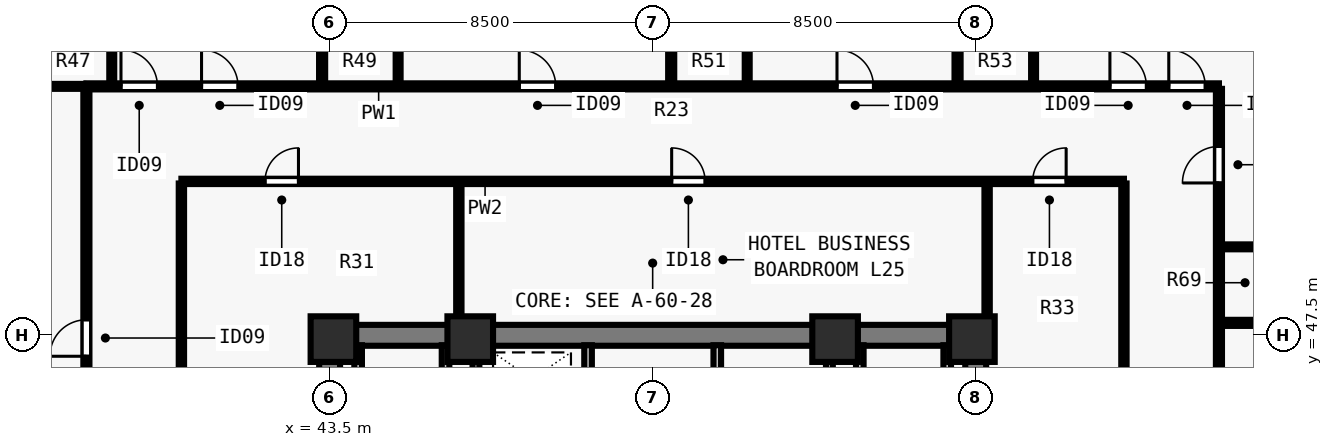
"""IFC4 building model, lengths in metres.
Left out: names, types, materials, properties, quantities, classifications, styles, units other than length and angle.
Written with IfcOpenShell. Run it as: python <this file> out.ifc"""

import sys

from ifc_helpers import new_model, si_unit, direction, frame, frame_2d, origin, origin_2d, place, context, subcontext, project, spatial, rectangle, extrude, element, fill, save


model = new_model("IFC4")
c1 = context("Model", 3, precision=1e-05, world=origin(), true_north=direction((0.0, 1.0)))
c2 = subcontext(c1, "Body", "Model", "MODEL_VIEW")
j1 = project(units=[si_unit("LENGTHUNIT", "METRE"), si_unit("PLANEANGLEUNIT", "RADIAN")], contexts=[c1])
p1 = place(None, origin())
s1 = spatial("IfcSite", under=j1, at=p1, CompositionType="ELEMENT")
p2 = place(p1, origin())
s2 = spatial("IfcBuilding", under=s1, at=p2, CompositionType="ELEMENT")
p3 = place(p2, frame((0.0, 0.0, 93.5)))
s3 = spatial("IfcBuildingStorey", under=s2, at=p3, CompositionType="ELEMENT", Elevation=93.5)
for number, where, z_axis, x_axis in (
    (1, (43.6, 47.4, 0.0), (0.0, 0.0, 1.0), (1.0, 0.0, 0.0)),
    (2, (47.2, 47.4, 0.0), (0.0, 0.0, 1.0), (1.0, 0.0, 0.0)),
    (3, (56.8, 47.4, 0.0), (0.0, 0.0, 1.0), (1.0, 0.0, 0.0)),
    (4, (60.4, 47.4, 0.0), (0.0, 0.0, 1.0), (1.0, 0.0, 0.0)),
):
    element("IfcColumn", number, at=place(p3, frame(where, z_axis=z_axis, x_axis=x_axis)), inside=s3, PredefinedType="COLUMN", context=c2, shape_type="SweptSolid", body=[
        extrude(rectangle(XDim=1.2, YDim=1.2, at=origin_2d()), origin(), (0.0, 0.0, 1.0), 3.5),
    ])
p4 = place(p3, frame((43.225, 47.5, 0.0), z_axis=(0.0, 0.0, 1.0), x_axis=(1.0, 0.0, 0.0)))
e5 = element("IfcWall", 5, at=p4, inside=s3, PredefinedType="SHEAR", context=c2, shape_type="SweptSolid", body=[
    extrude(rectangle(XDim=17.55, YDim=0.55, at=frame_2d((8.775, 0.0))), origin(), (0.0, 0.0, 1.0), 3.24),
])
for number, where, z_axis, x_axis in (
    (6, (43.5, 40.8, 0.0), (0.0, 0.0, 1.0), (0.0, 1.0, 0.0)),
    (7, (60.5, 40.8, 0.0), (0.0, 0.0, 1.0), (0.0, 1.0, 0.0)),
):
    element("IfcWall", number, at=place(p3, frame(where, z_axis=z_axis, x_axis=x_axis)), inside=s3, PredefinedType="SHEAR", context=c2, shape_type="SweptSolid", body=[
        extrude(rectangle(XDim=6.435, YDim=0.55, at=frame_2d((3.218, 0.0))), origin(), (0.0, 0.0, 1.0), 3.24),
    ])
p5 = place(p3, frame((50.3, 40.585, 0.0), z_axis=(0.0, 0.0, 1.0), x_axis=(0.0, 1.0, 0.0)))
e8 = element("IfcWall", 8, at=p5, inside=s3, PredefinedType="SOLIDWALL", context=c2, shape_type="SweptSolid", body=[
    extrude(rectangle(XDim=6.655, YDim=0.2, at=frame_2d((3.328, 0.0))), origin(), (0.0, 0.0, 1.0), 3.24),
])
p6 = place(p5, frame((5.065, 0.0, 0.0)))
e9 = element("IfcOpeningElement", 9, at=p6, cuts=e8, PredefinedType="OPENING", context=c2, shape_type="SweptSolid", body=[
    extrude(rectangle(XDim=0.8, YDim=2.08, at=frame_2d((0.4, 1.04))), frame((0.0, 0.11, 0.0), z_axis=(0.0, -1.0, 0.0), x_axis=(1.0, 0.0, 0.0)), (0.0, 0.0, 1.0), 0.22),
])
p7 = place(p3, frame((53.7, 40.585, 0.0), z_axis=(0.0, 0.0, 1.0), x_axis=(0.0, 1.0, 0.0)))
e10 = element("IfcWall", 10, at=p7, inside=s3, PredefinedType="SOLIDWALL", context=c2, shape_type="SweptSolid", body=[
    extrude(rectangle(XDim=6.655, YDim=0.2, at=frame_2d((3.328, 0.0))), origin(), (0.0, 0.0, 1.0), 3.24),
])
p8 = place(p7, frame((0.195, 0.0, 0.0)))
e11 = element("IfcOpeningElement", 11, at=p8, cuts=e10, PredefinedType="OPENING", context=c2, shape_type="SweptSolid", body=[
    extrude(rectangle(XDim=0.8, YDim=2.08, at=frame_2d((0.4, 1.04))), frame((0.0, 0.11, 0.0), z_axis=(0.0, -1.0, 0.0), x_axis=(1.0, 0.0, 0.0)), (0.0, 0.0, 1.0), 0.22),
])
p9 = place(p7, frame((4.265, 0.0, 0.0)))
e12 = element("IfcOpeningElement", 12, at=p9, cuts=e10, PredefinedType="OPENING", context=c2, shape_type="SweptSolid", body=[
    extrude(rectangle(XDim=0.95, YDim=2.12, at=frame_2d((0.475, 1.06))), frame((0.0, 0.11, 0.0), z_axis=(0.0, -1.0, 0.0), x_axis=(1.0, 0.0, 0.0)), (0.0, 0.0, 1.0), 0.22),
])
for number, where, z_axis, x_axis in (
    (13, (46.55, 43.735, 0.0), (0.0, 0.0, 1.0), (0.0, 1.0, 0.0)),
    (14, (44.25, 43.735, 0.0), (0.0, 0.0, 1.0), (0.0, 1.0, 0.0)),
    (15, (57.45, 43.735, 0.0), (0.0, 0.0, 1.0), (0.0, 1.0, 0.0)),
    (16, (59.75, 43.735, 0.0), (0.0, 0.0, 1.0), (0.0, 1.0, 0.0)),
):
    element("IfcWall", number, at=place(p3, frame(where, z_axis=z_axis, x_axis=x_axis)), inside=s3, PredefinedType="SOLIDWALL", context=c2, shape_type="SweptSolid", body=[
        extrude(rectangle(XDim=3.505, YDim=0.2, at=frame_2d((1.752, 0.0))), origin(), (0.0, 0.0, 1.0), 3.24),
    ])
for number, where, z_axis, x_axis in (
    (17, (47.35, 43.735, 0.0), (0.0, 0.0, 1.0), (0.0, 1.0, 0.0)),
    (18, (56.65, 43.735, 0.0), (0.0, 0.0, 1.0), (0.0, 1.0, 0.0)),
):
    element("IfcWall", number, at=place(p3, frame(where, z_axis=z_axis, x_axis=x_axis)), inside=s3, PredefinedType="SOLIDWALL", context=c2, shape_type="SweptSolid", body=[
        extrude(rectangle(XDim=3.505, YDim=0.18, at=frame_2d((1.752, 0.0))), origin(), (0.0, 0.0, 1.0), 3.24),
    ])
p10 = place(p3, frame((37.1, 54.05, 0.0), z_axis=(0.0, 0.0, 1.0), x_axis=(1.0, 0.0, 0.0)))
e19 = element("IfcWall", 19, at=p10, inside=s3, PredefinedType="PARTITIONING", context=c2, shape_type="SweptSolid", body=[
    extrude(rectangle(XDim=29.8, YDim=0.16, at=frame_2d((14.9, 0.0))), origin(), (0.0, 0.0, 1.0), 3.24),
])
p11 = place(p10, frame((0.91, 0.0, 0.0)))
e20 = element("IfcOpeningElement", 20, at=p11, cuts=e19, PredefinedType="OPENING", context=c2, shape_type="SweptSolid", body=[
    extrude(rectangle(XDim=0.96, YDim=2.15, at=frame_2d((0.48, 1.075))), frame((0.0, 0.09, 0.0), z_axis=(0.0, -1.0, 0.0), x_axis=(1.0, 0.0, 0.0)), (0.0, 0.0, 1.0), 0.18),
])
p12 = place(p10, frame((3.03, 0.0, 0.0)))
e21 = element("IfcOpeningElement", 21, at=p12, cuts=e19, PredefinedType="OPENING", context=c2, shape_type="SweptSolid", body=[
    extrude(rectangle(XDim=0.96, YDim=2.15, at=frame_2d((0.48, 1.075))), frame((0.0, 0.09, 0.0), z_axis=(0.0, -1.0, 0.0), x_axis=(1.0, 0.0, 0.0)), (0.0, 0.0, 1.0), 0.18),
])
p13 = place(p10, frame((11.39, 0.0, 0.0)))
e22 = element("IfcOpeningElement", 22, at=p13, cuts=e19, PredefinedType="OPENING", context=c2, shape_type="SweptSolid", body=[
    extrude(rectangle(XDim=0.96, YDim=2.15, at=frame_2d((0.48, 1.075))), frame((0.0, 0.09, 0.0), z_axis=(0.0, -1.0, 0.0), x_axis=(1.0, 0.0, 0.0)), (0.0, 0.0, 1.0), 0.18),
])
p14 = place(p10, frame((19.75, 0.0, 0.0)))
e23 = element("IfcOpeningElement", 23, at=p14, cuts=e19, PredefinedType="OPENING", context=c2, shape_type="SweptSolid", body=[
    extrude(rectangle(XDim=0.96, YDim=2.15, at=frame_2d((0.48, 1.075))), frame((0.0, 0.09, 0.0), z_axis=(0.0, -1.0, 0.0), x_axis=(1.0, 0.0, 0.0)), (0.0, 0.0, 1.0), 0.18),
])
p15 = place(p10, frame((26.931, 0.0, 0.0)))
e24 = element("IfcOpeningElement", 24, at=p15, cuts=e19, PredefinedType="OPENING", context=c2, shape_type="SweptSolid", body=[
    extrude(rectangle(XDim=0.96, YDim=2.15, at=frame_2d((0.48, 1.075))), frame((0.0, 0.09, 0.0), z_axis=(0.0, -1.0, 0.0), x_axis=(1.0, 0.0, 0.0)), (0.0, 0.0, 1.0), 0.18),
])
p16 = place(p10, frame((28.48, 0.0, 0.0)))
e25 = element("IfcOpeningElement", 25, at=p16, cuts=e19, PredefinedType="OPENING", context=c2, shape_type="SweptSolid", body=[
    extrude(rectangle(XDim=0.96, YDim=2.15, at=frame_2d((0.48, 1.075))), frame((0.0, 0.09, 0.0), z_axis=(0.0, -1.0, 0.0), x_axis=(1.0, 0.0, 0.0)), (0.0, 0.0, 1.0), 0.18),
])
p17 = place(p3, frame((37.1, 24.015, 0.0), z_axis=(0.0, 0.0, 1.0), x_axis=(0.0, 1.0, 0.0)))
e26 = element("IfcWall", 26, at=p17, inside=s3, PredefinedType="PARTITIONING", context=c2, shape_type="SweptSolid", body=[
    extrude(rectangle(XDim=29.97, YDim=0.16, at=frame_2d((14.985, 0.0))), origin(), (0.0, 0.0, 1.0), 3.24),
])
p18 = place(p17, frame((8.134, 0.0, 0.0)))
e27 = element("IfcOpeningElement", 27, at=p18, cuts=e26, PredefinedType="OPENING", context=c2, shape_type="SweptSolid", body=[
    extrude(rectangle(XDim=0.96, YDim=2.15, at=frame_2d((0.48, 1.075))), frame((0.0, 0.09, 0.0), z_axis=(0.0, -1.0, 0.0), x_axis=(1.0, 0.0, 0.0)), (0.0, 0.0, 1.0), 0.18),
])
p19 = place(p17, frame((22.934, 0.0, 0.0)))
e28 = element("IfcOpeningElement", 28, at=p19, cuts=e26, PredefinedType="OPENING", context=c2, shape_type="SweptSolid", body=[
    extrude(rectangle(XDim=0.96, YDim=2.15, at=frame_2d((0.48, 1.075))), frame((0.0, 0.09, 0.0), z_axis=(0.0, -1.0, 0.0), x_axis=(1.0, 0.0, 0.0)), (0.0, 0.0, 1.0), 0.18),
])
p20 = place(p3, frame((66.9, 24.015, 0.0), z_axis=(0.0, 0.0, 1.0), x_axis=(0.0, 1.0, 0.0)))
e29 = element("IfcWall", 29, at=p20, inside=s3, PredefinedType="PARTITIONING", context=c2, shape_type="SweptSolid", body=[
    extrude(rectangle(XDim=29.97, YDim=0.16, at=frame_2d((14.985, 0.0))), origin(), (0.0, 0.0, 1.0), 3.24),
])
p21 = place(p20, frame((3.911, 0.0, 0.0)))
e30 = element("IfcOpeningElement", 30, at=p21, cuts=e29, PredefinedType="OPENING", context=c2, shape_type="SweptSolid", body=[
    extrude(rectangle(XDim=0.96, YDim=2.15, at=frame_2d((0.48, 1.075))), frame((0.0, 0.09, 0.0), z_axis=(0.0, -1.0, 0.0), x_axis=(1.0, 0.0, 0.0)), (0.0, 0.0, 1.0), 0.18),
])
p22 = place(p20, frame((9.544, 0.0, 0.0)))
e31 = element("IfcOpeningElement", 31, at=p22, cuts=e29, PredefinedType="OPENING", context=c2, shape_type="SweptSolid", body=[
    extrude(rectangle(XDim=0.96, YDim=2.15, at=frame_2d((0.48, 1.075))), frame((0.0, 0.09, 0.0), z_axis=(0.0, -1.0, 0.0), x_axis=(1.0, 0.0, 0.0)), (0.0, 0.0, 1.0), 0.18),
])
p23 = place(p20, frame((15.625, 0.0, 0.0)))
e32 = element("IfcOpeningElement", 32, at=p23, cuts=e29, PredefinedType="OPENING", context=c2, shape_type="SweptSolid", body=[
    extrude(rectangle(XDim=0.96, YDim=2.15, at=frame_2d((0.48, 1.075))), frame((0.0, 0.09, 0.0), z_axis=(0.0, -1.0, 0.0), x_axis=(1.0, 0.0, 0.0)), (0.0, 0.0, 1.0), 0.18),
])
p24 = place(p20, frame((21.584, 0.0, 0.0)))
e33 = element("IfcOpeningElement", 33, at=p24, cuts=e29, PredefinedType="OPENING", context=c2, shape_type="SweptSolid", body=[
    extrude(rectangle(XDim=0.96, YDim=2.15, at=frame_2d((0.48, 1.075))), frame((0.0, 0.09, 0.0), z_axis=(0.0, -1.0, 0.0), x_axis=(1.0, 0.0, 0.0)), (0.0, 0.0, 1.0), 0.18),
])
p25 = place(p20, frame((27.494, 0.0, 0.0)))
e34 = element("IfcOpeningElement", 34, at=p25, cuts=e29, PredefinedType="OPENING", context=c2, shape_type="SweptSolid", body=[
    extrude(rectangle(XDim=0.96, YDim=2.15, at=frame_2d((0.48, 1.075))), frame((0.0, 0.09, 0.0), z_axis=(0.0, -1.0, 0.0), x_axis=(1.0, 0.0, 0.0)), (0.0, 0.0, 1.0), 0.18),
])
p26 = place(p3, frame((39.6, 51.55, 0.0), z_axis=(0.0, 0.0, 1.0), x_axis=(1.0, 0.0, 0.0)))
e35 = element("IfcWall", 35, at=p26, inside=s3, PredefinedType="PARTITIONING", context=c2, shape_type="SweptSolid", body=[
    extrude(rectangle(XDim=24.8, YDim=0.14, at=frame_2d((12.4, 0.0))), origin(), (0.0, 0.0, 1.0), 3.24),
])
p27 = place(p26, frame((2.2, 0.0, 0.0)))
e36 = element("IfcOpeningElement", 36, at=p27, cuts=e35, PredefinedType="OPENING", context=c2, shape_type="SweptSolid", body=[
    extrude(rectangle(XDim=0.88, YDim=2.1, at=frame_2d((0.44, 1.05))), frame((0.0, 0.08, 0.0), z_axis=(0.0, -1.0, 0.0), x_axis=(1.0, 0.0, 0.0)), (0.0, 0.0, 1.0), 0.16),
])
p28 = place(p26, frame((12.9, 0.0, 0.0)))
e37 = element("IfcOpeningElement", 37, at=p28, cuts=e35, PredefinedType="OPENING", context=c2, shape_type="SweptSolid", body=[
    extrude(rectangle(XDim=0.88, YDim=2.1, at=frame_2d((0.44, 1.05))), frame((0.0, 0.08, 0.0), z_axis=(0.0, -1.0, 0.0), x_axis=(1.0, 0.0, 0.0)), (0.0, 0.0, 1.0), 0.16),
])
p29 = place(p26, frame((22.4, 0.0, 0.0)))
e38 = element("IfcOpeningElement", 38, at=p29, cuts=e35, PredefinedType="OPENING", context=c2, shape_type="SweptSolid", body=[
    extrude(rectangle(XDim=0.88, YDim=2.1, at=frame_2d((0.44, 1.05))), frame((0.0, 0.08, 0.0), z_axis=(0.0, -1.0, 0.0), x_axis=(1.0, 0.0, 0.0)), (0.0, 0.0, 1.0), 0.16),
])
p30 = place(p3, frame((39.6, 40.8, 0.0), z_axis=(0.0, 0.0, 1.0), x_axis=(0.0, 1.0, 0.0)))
e39 = element("IfcWall", 39, at=p30, inside=s3, PredefinedType="PARTITIONING", context=c2, shape_type="SweptSolid", body=[
    extrude(rectangle(XDim=10.695, YDim=0.14, at=frame_2d((5.348, 0.0))), origin(), (0.0, 0.0, 1.0), 3.24),
])
p31 = place(p30, frame((2.5, 0.0, 0.0)))
e40 = element("IfcOpeningElement", 40, at=p31, cuts=e39, PredefinedType="OPENING", context=c2, shape_type="SweptSolid", body=[
    extrude(rectangle(XDim=0.88, YDim=2.1, at=frame_2d((0.44, 1.05))), frame((0.0, 0.08, 0.0), z_axis=(0.0, -1.0, 0.0), x_axis=(1.0, 0.0, 0.0)), (0.0, 0.0, 1.0), 0.16),
])
p32 = place(p3, frame((64.4, 40.8, 0.0), z_axis=(0.0, 0.0, 1.0), x_axis=(0.0, 1.0, 0.0)))
e41 = element("IfcWall", 41, at=p32, inside=s3, PredefinedType="PARTITIONING", context=c2, shape_type="SweptSolid", body=[
    extrude(rectangle(XDim=10.695, YDim=0.14, at=frame_2d((5.348, 0.0))), origin(), (0.0, 0.0, 1.0), 3.24),
])
p33 = place(p32, frame((2.5, 0.0, 0.0)))
e42 = element("IfcOpeningElement", 42, at=p33, cuts=e41, PredefinedType="OPENING", context=c2, shape_type="SweptSolid", body=[
    extrude(rectangle(XDim=0.88, YDim=2.1, at=frame_2d((0.44, 1.05))), frame((0.0, 0.08, 0.0), z_axis=(0.0, -1.0, 0.0), x_axis=(1.0, 0.0, 0.0)), (0.0, 0.0, 1.0), 0.16),
])
p34 = place(p3, frame((46.9, 47.76, 0.0), z_axis=(0.0, 0.0, 1.0), x_axis=(0.0, 1.0, 0.0)))
e43 = element("IfcWall", 43, at=p34, inside=s3, PredefinedType="PARTITIONING", context=c2, shape_type="SweptSolid", body=[
    extrude(rectangle(XDim=3.735, YDim=0.14, at=frame_2d((1.868, 0.0))), origin(), (0.0, 0.0, 1.0), 3.24),
])
p35 = place(p3, frame((60.8, 47.76, 0.0), z_axis=(0.0, 0.0, 1.0), x_axis=(0.0, 1.0, 0.0)))
e44 = element("IfcWall", 44, at=p35, inside=s3, PredefinedType="PARTITIONING", context=c2, shape_type="SweptSolid", body=[
    extrude(rectangle(XDim=3.735, YDim=0.14, at=frame_2d((1.868, 0.0))), origin(), (0.0, 0.0, 1.0), 2.399),
])
p36 = place(p3, frame((37.768, 54.115, 0.0), z_axis=(0.0, 0.0, 1.0), x_axis=(0.0, 1.0, 0.0)))
e45 = element("IfcWall", 45, at=p36, inside=s3, PredefinedType="PLUMBINGWALL", context=c2, shape_type="SweptSolid", body=[
    extrude(rectangle(XDim=2.235, YDim=0.13, at=frame_2d((1.118, 0.0))), origin(), (0.0, 0.0, 1.0), 2.399),
])
p37 = place(p3, frame((35.833, 54.05, 0.0), z_axis=(0.0, 0.0, 1.0), x_axis=(1.0, 0.0, 0.0)))
e46 = element("IfcWall", 46, at=p37, inside=s3, PredefinedType="PLUMBINGWALL", context=c2, shape_type="SweptSolid", body=[
    extrude(rectangle(XDim=1.188, YDim=0.13, at=frame_2d((0.594, 0.0))), origin(), (0.0, 0.0, 1.0), 3.24),
])
p38 = place(p3, frame((43.302, 54.115, 0.0), z_axis=(0.0, 0.0, 1.0), x_axis=(0.0, 1.0, 0.0)))
e47 = element("IfcWall", 47, at=p38, inside=s3, PredefinedType="PARTITIONING", context=c2, shape_type="SweptSolid", body=[
    extrude(rectangle(XDim=10.04, YDim=0.16, at=frame_2d((5.02, 0.0))), origin(), (0.0, 0.0, 1.0), 3.24),
])
p39 = place(p3, frame((45.302, 54.115, 0.0), z_axis=(0.0, 0.0, 1.0), x_axis=(0.0, 1.0, 0.0)))
e48 = element("IfcWall", 48, at=p39, inside=s3, PredefinedType="PLUMBINGWALL", context=c2, shape_type="SweptSolid", body=[
    extrude(rectangle(XDim=2.235, YDim=0.13, at=frame_2d((1.118, 0.0))), origin(), (0.0, 0.0, 1.0), 3.24),
])
p40 = place(p3, frame((52.488, 54.115, 0.0), z_axis=(0.0, 0.0, 1.0), x_axis=(0.0, 1.0, 0.0)))
e49 = element("IfcWall", 49, at=p40, inside=s3, PredefinedType="PARTITIONING", context=c2, shape_type="SweptSolid", body=[
    extrude(rectangle(XDim=10.04, YDim=0.16, at=frame_2d((5.02, 0.0))), origin(), (0.0, 0.0, 1.0), 2.809),
])
p41 = place(p3, frame((54.488, 54.115, 0.0), z_axis=(0.0, 0.0, 1.0), x_axis=(0.0, 1.0, 0.0)))
e50 = element("IfcWall", 50, at=p41, inside=s3, PredefinedType="PLUMBINGWALL", context=c2, shape_type="SweptSolid", body=[
    extrude(rectangle(XDim=2.235, YDim=0.13, at=frame_2d((1.118, 0.0))), origin(), (0.0, 0.0, 1.0), 3.24),
])
p42 = place(p3, frame((60.022, 54.115, 0.0), z_axis=(0.0, 0.0, 1.0), x_axis=(0.0, 1.0, 0.0)))
e51 = element("IfcWall", 51, at=p42, inside=s3, PredefinedType="PARTITIONING", context=c2, shape_type="SweptSolid", body=[
    extrude(rectangle(XDim=9.97, YDim=0.16, at=frame_2d((4.985, 0.0))), origin(), (0.0, 0.0, 1.0), 3.24),
])
p43 = place(p3, frame((62.022, 54.115, 0.0), z_axis=(0.0, 0.0, 1.0), x_axis=(0.0, 1.0, 0.0)))
e52 = element("IfcWall", 52, at=p43, inside=s3, PredefinedType="PLUMBINGWALL", context=c2, shape_type="SweptSolid", body=[
    extrude(rectangle(XDim=2.235, YDim=0.13, at=frame_2d((1.118, 0.0))), origin(), (0.0, 0.0, 1.0), 3.24),
])
p44 = place(p3, frame((66.965, 47.827, 0.0), z_axis=(0.0, 0.0, 1.0), x_axis=(1.0, 0.0, 0.0)))
e53 = element("IfcWall", 53, at=p44, inside=s3, PredefinedType="PARTITIONING", context=c2, shape_type="SweptSolid", body=[
    extrude(rectangle(XDim=10.19, YDim=0.16, at=frame_2d((5.095, 0.0))), origin(), (0.0, 0.0, 1.0), 3.24),
])
p45 = place(p3, frame((66.965, 49.827, 0.0), z_axis=(0.0, 0.0, 1.0), x_axis=(1.0, 0.0, 0.0)))
e54 = element("IfcWall", 54, at=p45, inside=s3, PredefinedType="PLUMBINGWALL", context=c2, shape_type="SweptSolid", body=[
    extrude(rectangle(XDim=2.235, YDim=0.13, at=frame_2d((1.117, 0.0))), origin(), (0.0, 0.0, 1.0), 3.24),
])
p46 = place(p27, origin())
e55 = element("IfcDoor", 55, at=p46, inside=s3, OperationType="SINGLE_SWING_RIGHT", PredefinedType="DOOR", context=c2, shape_type="SweptSolid", body=[
    extrude(rectangle(XDim=0.88, YDim=2.1, at=frame_2d((0.44, 1.05))), frame((0.0, 0.025, 0.0), z_axis=(0.0, -1.0, 0.0), x_axis=(1.0, 0.0, 0.0)), (0.0, 0.0, 1.0), 0.05),
])
fill(e36, e55)
p47 = place(p28, origin())
e56 = element("IfcDoor", 56, at=p47, inside=s3, OperationType="SINGLE_SWING_LEFT", PredefinedType="DOOR", context=c2, shape_type="SweptSolid", body=[
    extrude(rectangle(XDim=0.88, YDim=2.1, at=frame_2d((0.44, 1.05))), frame((0.0, 0.025, 0.0), z_axis=(0.0, -1.0, 0.0), x_axis=(1.0, 0.0, 0.0)), (0.0, 0.0, 1.0), 0.05),
])
fill(e37, e56)
p48 = place(p29, origin())
e57 = element("IfcDoor", 57, at=p48, inside=s3, OperationType="SINGLE_SWING_RIGHT", PredefinedType="DOOR", context=c2, shape_type="SweptSolid", body=[
    extrude(rectangle(XDim=0.88, YDim=2.1, at=frame_2d((0.44, 1.05))), frame((0.0, 0.025, 0.0), z_axis=(0.0, -1.0, 0.0), x_axis=(1.0, 0.0, 0.0)), (0.0, 0.0, 1.0), 0.05),
])
fill(e38, e57)
p49 = place(p11, origin())
e58 = element("IfcDoor", 58, at=p49, inside=s3, OperationType="SINGLE_SWING_LEFT", PredefinedType="DOOR", context=c2, shape_type="SweptSolid", body=[
    extrude(rectangle(XDim=0.96, YDim=2.15, at=frame_2d((0.48, 1.075))), frame((0.0, 0.025, 0.0), z_axis=(0.0, -1.0, 0.0), x_axis=(1.0, 0.0, 0.0)), (0.0, 0.0, 1.0), 0.05),
])
fill(e20, e58)
p50 = place(p12, origin())
e59 = element("IfcDoor", 59, at=p50, inside=s3, OperationType="SINGLE_SWING_LEFT", PredefinedType="DOOR", context=c2, shape_type="SweptSolid", body=[
    extrude(rectangle(XDim=0.96, YDim=2.15, at=frame_2d((0.48, 1.075))), frame((0.0, 0.025, 0.0), z_axis=(0.0, -1.0, 0.0), x_axis=(1.0, 0.0, 0.0)), (0.0, 0.0, 1.0), 0.05),
])
fill(e21, e59)
p51 = place(p13, origin())
e60 = element("IfcDoor", 60, at=p51, inside=s3, OperationType="SINGLE_SWING_LEFT", PredefinedType="DOOR", context=c2, shape_type="SweptSolid", body=[
    extrude(rectangle(XDim=0.96, YDim=2.15, at=frame_2d((0.48, 1.075))), frame((0.0, 0.025, 0.0), z_axis=(0.0, -1.0, 0.0), x_axis=(1.0, 0.0, 0.0)), (0.0, 0.0, 1.0), 0.05),
])
fill(e22, e60)
p52 = place(p14, origin())
e61 = element("IfcDoor", 61, at=p52, inside=s3, OperationType="SINGLE_SWING_LEFT", PredefinedType="DOOR", context=c2, shape_type="SweptSolid", body=[
    extrude(rectangle(XDim=0.96, YDim=2.15, at=frame_2d((0.48, 1.075))), frame((0.0, 0.025, 0.0), z_axis=(0.0, -1.0, 0.0), x_axis=(1.0, 0.0, 0.0)), (0.0, 0.0, 1.0), 0.05),
])
fill(e23, e61)
p53 = place(p15, origin())
e62 = element("IfcDoor", 62, at=p53, inside=s3, OperationType="SINGLE_SWING_LEFT", PredefinedType="DOOR", context=c2, shape_type="SweptSolid", body=[
    extrude(rectangle(XDim=0.96, YDim=2.15, at=frame_2d((0.48, 1.075))), frame((0.0, 0.025, 0.0), z_axis=(0.0, -1.0, 0.0), x_axis=(1.0, 0.0, 0.0)), (0.0, 0.0, 1.0), 0.05),
])
fill(e24, e62)
p54 = place(p16, origin())
e63 = element("IfcDoor", 63, at=p54, inside=s3, OperationType="SINGLE_SWING_LEFT", PredefinedType="DOOR", context=c2, shape_type="SweptSolid", body=[
    extrude(rectangle(XDim=0.96, YDim=2.15, at=frame_2d((0.48, 1.075))), frame((0.0, 0.025, 0.0), z_axis=(0.0, -1.0, 0.0), x_axis=(1.0, 0.0, 0.0)), (0.0, 0.0, 1.0), 0.05),
])
fill(e25, e63)
p55 = place(p19, origin())
e64 = element("IfcDoor", 64, at=p55, inside=s3, OperationType="SINGLE_SWING_LEFT", PredefinedType="DOOR", context=c2, shape_type="SweptSolid", body=[
    extrude(rectangle(XDim=0.96, YDim=2.15, at=frame_2d((0.48, 1.075))), frame((0.0, 0.025, 0.0), z_axis=(0.0, -1.0, 0.0), x_axis=(1.0, 0.0, 0.0)), (0.0, 0.0, 1.0), 0.05),
])
fill(e28, e64)
p56 = place(p25, origin())
e65 = element("IfcDoor", 65, at=p56, inside=s3, OperationType="SINGLE_SWING_LEFT", PredefinedType="DOOR", context=c2, shape_type="SweptSolid", body=[
    extrude(rectangle(XDim=0.96, YDim=2.15, at=frame_2d((0.48, 1.075))), frame((0.0, 0.025, 0.0), z_axis=(0.0, -1.0, 0.0), x_axis=(1.0, 0.0, 0.0)), (0.0, 0.0, 1.0), 0.05),
])
fill(e34, e65)
save(model, sys.argv[1])
